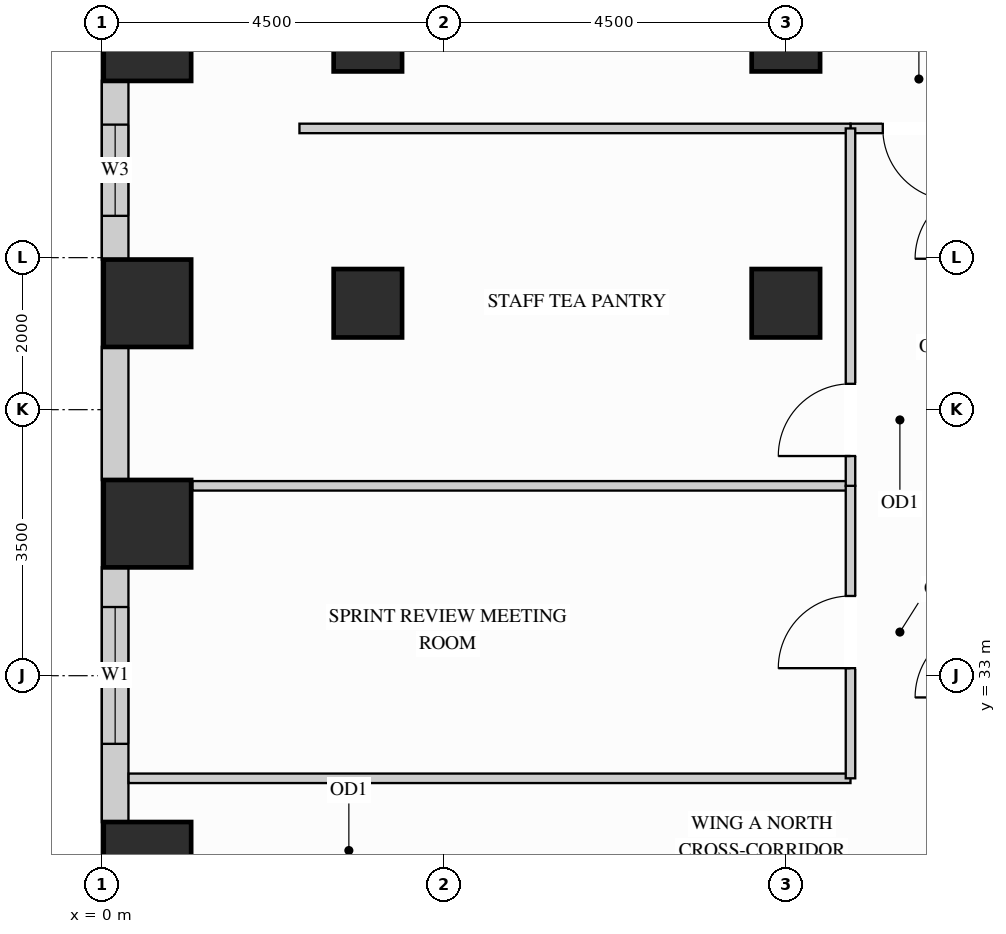
"""IFC4 building model, lengths in metres.
Left out: names, types, materials, properties, quantities, classifications, styles, units other than length and angle.
Written with IfcOpenShell. Run it as: python <this file> out.ifc"""

import sys

from ifc_helpers import new_model, si_unit, direction, frame, frame_2d, origin, origin_2d, place, context, subcontext, project, spatial, rectangle, extrude, source, transform, mapped, element, fill, save


model = new_model("IFC4")
c1 = context("Model", 3, precision=1e-05, world=origin(), true_north=direction((0.0, 1.0)))
c2 = subcontext(c1, "Body", "Model", "MODEL_VIEW")
j1 = project(units=[si_unit("LENGTHUNIT", "METRE"), si_unit("PLANEANGLEUNIT", "RADIAN")], contexts=[c1])
p1 = place(None, origin())
s1 = spatial("IfcSite", under=j1, at=p1, CompositionType="ELEMENT")
p2 = place(p1, origin())
s2 = spatial("IfcBuilding", under=s1, at=p2, CompositionType="ELEMENT")
p3 = place(p2, frame((0.0, 0.0, 102.6)))
s3 = spatial("IfcBuildingStorey", under=s2, at=p3, CompositionType="ELEMENT", Elevation=102.6)
m1 = source(origin(), c2, "Body", "SweptSolid", [
    extrude(rectangle(XDim=0.9, YDim=0.9, at=origin_2d()), origin(), (0.0, 0.0, 1.0), 3.38),
])
for number, where, z_axis, x_axis in (
    (1, (3.5, 37.9, 0.0), (0.0, 0.0, 1.0), (1.0, 0.0, 0.0)),
    (2, (3.5, 41.4, 0.0), (0.0, 0.0, 1.0), (1.0, 0.0, 0.0)),
    (3, (9.0, 37.9, 0.0), (0.0, 0.0, 1.0), (1.0, 0.0, 0.0)),
    (4, (9.0, 41.4, 0.0), (0.0, 0.0, 1.0), (1.0, 0.0, 0.0)),
):
    element("IfcColumn", number, at=place(p3, frame(where, z_axis=z_axis, x_axis=x_axis)), inside=s3, PredefinedType="COLUMN", context=c2, shape_type="MappedRepresentation", body=[
        mapped(m1, transform((0.0, 0.0, 0.0), x_axis=(1.0, 0.0, 0.0), y_axis=(0.0, 1.0, 0.0), z_axis=(0.0, 0.0, 1.0))),
    ])
m2 = source(origin(), c2, "Body", "SweptSolid", [
    extrude(rectangle(XDim=1.15, YDim=1.15, at=origin_2d()), origin(), (0.0, 0.0, 1.0), 3.38),
])
for number, where, z_axis, x_axis in (
    (5, (0.6, 30.5, 0.0), (0.0, 0.0, 1.0), (1.0, 0.0, 0.0)),
    (6, (0.6, 35.0, 0.0), (0.0, 0.0, 1.0), (1.0, 0.0, 0.0)),
    (7, (0.6, 37.9, 0.0), (0.0, 0.0, 1.0), (1.0, 0.0, 0.0)),
    (8, (0.6, 41.4, 0.0), (0.0, 0.0, 1.0), (1.0, 0.0, 0.0)),
):
    element("IfcColumn", number, at=place(p3, frame(where, z_axis=z_axis, x_axis=x_axis)), inside=s3, PredefinedType="COLUMN", context=c2, shape_type="MappedRepresentation", body=[
        mapped(m2, transform((0.0, 0.0, 0.0), x_axis=(1.0, 0.0, 0.0), y_axis=(0.0, 1.0, 0.0), z_axis=(0.0, 0.0, 1.0))),
    ])
p4 = place(p3, frame((0.175, 40.827, 0.0), z_axis=(0.0, 0.0, 1.0), x_axis=(0.0, -1.0, 0.0)))
e9 = element("IfcWall", 9, at=p4, inside=s3, PredefinedType="SOLIDWALL", context=c2, shape_type="SweptSolid", body=[
    extrude(rectangle(XDim=2.354, YDim=0.35, at=frame_2d((1.177, 0.0))), origin(), (0.0, 0.0, 1.0), 3.365),
])
p5 = place(p4, frame((0.577, 0.0, 0.78)))
e10 = element("IfcOpeningElement", 10, at=p5, cuts=e9, PredefinedType="OPENING", context=c2, shape_type="SweptSolid", body=[
    extrude(rectangle(XDim=1.2, YDim=2.1, at=frame_2d((0.6, 1.05))), frame((0.0, 0.185, 0.0), z_axis=(0.0, -1.0, 0.0), x_axis=(1.0, 0.0, 0.0)), (0.0, 0.0, 1.0), 0.37),
])
m3 = source(origin(), c2, "Body", "SweptSolid", [
    extrude(rectangle(XDim=1.754, YDim=0.35, at=frame_2d((0.877, 0.0))), origin(), (0.0, 0.0, 1.0), 3.365),
])
p6 = place(p3, frame((0.175, 37.327, 0.0), z_axis=(0.0, 0.0, 1.0), x_axis=(0.0, -1.0, 0.0)))
e11 = element("IfcWall", 11, at=p6, inside=s3, PredefinedType="SOLIDWALL", context=c2, shape_type="MappedRepresentation", body=[
    mapped(m3, transform((0.0, 0.0, 0.0), x_axis=(1.0, 0.0, 0.0), y_axis=(0.0, 1.0, 0.0), z_axis=(0.0, 0.0, 1.0))),
])
p7 = place(p3, frame((0.175, 34.427, 0.0), z_axis=(0.0, 0.0, 1.0), x_axis=(0.0, -1.0, 0.0)))
e12 = element("IfcWall", 12, at=p7, inside=s3, PredefinedType="SOLIDWALL", context=c2, shape_type="SweptSolid", body=[
    extrude(rectangle(XDim=3.354, YDim=0.35, at=frame_2d((1.677, 0.0))), origin(), (0.0, 0.0, 1.0), 3.365),
])
p8 = place(p7, frame((0.523, 0.0, 0.78)))
e13 = element("IfcOpeningElement", 13, at=p8, cuts=e12, PredefinedType="OPENING", context=c2, shape_type="SweptSolid", body=[
    extrude(rectangle(XDim=1.8, YDim=2.1, at=frame_2d((0.9, 1.05))), frame((0.0, 0.185, 0.0), z_axis=(0.0, -1.0, 0.0), x_axis=(1.0, 0.0, 0.0)), (0.0, 0.0, 1.0), 0.37),
])
m4 = source(origin(), c2, "Body", "SweptSolid", [
    extrude(rectangle(XDim=9.498, YDim=0.125, at=frame_2d((4.749, 0.0))), origin(), (0.0, 0.0, 1.0), 2.828),
])
p9 = place(p3, frame((0.352, 31.65, 0.0), z_axis=(0.0, 0.0, 1.0), x_axis=(1.0, 0.0, 0.0)))
e14 = element("IfcWall", 14, at=p9, inside=s3, PredefinedType="PARTITIONING", context=c2, shape_type="MappedRepresentation", body=[
    mapped(m4, transform((0.0, 0.0, 0.0), x_axis=(1.0, 0.0, 0.0), y_axis=(0.0, 1.0, 0.0), z_axis=(0.0, 0.0, 1.0))),
])
m5 = source(origin(), c2, "Body", "SweptSolid", [
    extrude(rectangle(XDim=8.66, YDim=0.125, at=frame_2d((4.33, 0.0))), origin(), (0.0, 0.0, 1.0), 3.365),
])
p10 = place(p3, frame((1.19, 35.498, 0.0), z_axis=(0.0, 0.0, 1.0), x_axis=(1.0, 0.0, 0.0)))
e15 = element("IfcWall", 15, at=p10, inside=s3, PredefinedType="PARTITIONING", context=c2, shape_type="MappedRepresentation", body=[
    mapped(m5, transform((0.0, 0.0, 0.0), x_axis=(1.0, 0.0, 0.0), y_axis=(0.0, 1.0, 0.0), z_axis=(0.0, 0.0, 1.0))),
])
p11 = place(p3, frame((9.85, 40.2, 0.0), z_axis=(0.0, 0.0, 1.0), x_axis=(1.0, 0.0, 0.0)))
e16 = element("IfcWall", 16, at=p11, inside=s3, PredefinedType="PARTITIONING", context=c2, shape_type="SweptSolid", body=[
    extrude(rectangle(XDim=1.8, YDim=0.125, at=frame_2d((0.9, 0.0))), origin(), (0.0, 0.0, 1.0), 3.365),
])
p12 = place(p11, frame((0.425, 0.0, 0.0)))
e17 = element("IfcOpeningElement", 17, at=p12, cuts=e16, PredefinedType="OPENING", context=c2, shape_type="SweptSolid", body=[
    extrude(rectangle(XDim=0.95, YDim=2.15, at=frame_2d((0.475, 1.075))), frame((0.0, 0.073, 0.0), z_axis=(0.0, -1.0, 0.0), x_axis=(1.0, 0.0, 0.0)), (0.0, 0.0, 1.0), 0.145),
])
m6 = source(origin(), c2, "Body", "SweptSolid", [
    extrude(rectangle(XDim=7.25, YDim=0.125, at=frame_2d((3.625, 0.0))), origin(), (0.0, 0.0, 1.0), 3.365),
])
p13 = place(p3, frame((2.6, 40.2, 0.0), z_axis=(0.0, 0.0, 1.0), x_axis=(1.0, 0.0, 0.0)))
e18 = element("IfcWall", 18, at=p13, inside=s3, PredefinedType="PARTITIONING", context=c2, shape_type="MappedRepresentation", body=[
    mapped(m6, transform((0.0, 0.0, 0.0), x_axis=(1.0, 0.0, 0.0), y_axis=(0.0, 1.0, 0.0), z_axis=(0.0, 0.0, 1.0))),
])
p14 = place(p3, frame((9.85, 31.65, 0.0), z_axis=(0.0, 0.0, 1.0), x_axis=(0.0, 1.0, 0.0)))
e19 = element("IfcWall", 19, at=p14, inside=s3, PredefinedType="PARTITIONING", context=c2, shape_type="SweptSolid", body=[
    extrude(rectangle(XDim=3.848, YDim=0.125, at=frame_2d((1.924, 0.0))), origin(), (0.0, 0.0, 1.0), 3.365),
])
p15 = place(p14, frame((1.449, 0.0, 0.0)))
e20 = element("IfcOpeningElement", 20, at=p15, cuts=e19, PredefinedType="OPENING", context=c2, shape_type="SweptSolid", body=[
    extrude(rectangle(XDim=0.95, YDim=2.15, at=frame_2d((0.475, 1.075))), frame((0.0, 0.073, 0.0), z_axis=(0.0, -1.0, 0.0), x_axis=(1.0, 0.0, 0.0)), (0.0, 0.0, 1.0), 0.145),
])
p16 = place(p3, frame((9.85, 35.498, 0.0), z_axis=(0.0, 0.0, 1.0), x_axis=(0.0, 1.0, 0.0)))
e21 = element("IfcWall", 21, at=p16, inside=s3, PredefinedType="PARTITIONING", context=c2, shape_type="SweptSolid", body=[
    extrude(rectangle(XDim=4.702, YDim=0.125, at=frame_2d((2.351, 0.0))), origin(), (0.0, 0.0, 1.0), 3.365),
])
p17 = place(p16, frame((0.392, 0.0, 0.0)))
e22 = element("IfcOpeningElement", 22, at=p17, cuts=e21, PredefinedType="OPENING", context=c2, shape_type="SweptSolid", body=[
    extrude(rectangle(XDim=0.95, YDim=2.15, at=frame_2d((0.475, 1.075))), frame((0.0, 0.073, 0.0), z_axis=(0.0, -1.0, 0.0), x_axis=(1.0, 0.0, 0.0)), (0.0, 0.0, 1.0), 0.145),
])
m7 = source(origin(), c2, "Body", "SweptSolid", [
    extrude(rectangle(XDim=0.95, YDim=2.15, at=frame_2d((0.475, 1.075))), frame((0.0, 0.025, 0.0), z_axis=(0.0, -1.0, 0.0), x_axis=(1.0, 0.0, 0.0)), (0.0, 0.0, 1.0), 0.05),
])
p18 = place(p12, origin())
e23 = element("IfcDoor", 23, at=p18, inside=s3, OperationType="SINGLE_SWING_RIGHT", PredefinedType="DOOR", context=c2, shape_type="MappedRepresentation", body=[
    mapped(m7, transform((0.0, 0.0, 0.0), x_axis=(1.0, 0.0, 0.0), y_axis=(0.0, 1.0, 0.0), z_axis=(0.0, 0.0, 1.0))),
])
fill(e17, e23)
p19 = place(p15, origin())
e24 = element("IfcDoor", 24, at=p19, inside=s3, OperationType="SINGLE_SWING_LEFT", PredefinedType="DOOR", context=c2, shape_type="MappedRepresentation", body=[
    mapped(m7, transform((0.0, 0.0, 0.0), x_axis=(1.0, 0.0, 0.0), y_axis=(0.0, 1.0, 0.0), z_axis=(0.0, 0.0, 1.0))),
])
fill(e20, e24)
p20 = place(p17, origin())
e25 = element("IfcDoor", 25, at=p20, inside=s3, OperationType="SINGLE_SWING_LEFT", PredefinedType="DOOR", context=c2, shape_type="MappedRepresentation", body=[
    mapped(m7, transform((0.0, 0.0, 0.0), x_axis=(1.0, 0.0, 0.0), y_axis=(0.0, 1.0, 0.0), z_axis=(0.0, 0.0, 1.0))),
])
fill(e22, e25)
m8 = source(origin(), c2, "Body", "SweptSolid", [
    extrude(rectangle(XDim=1.8, YDim=2.1, at=frame_2d((0.9, 1.05))), frame((0.0, 0.03, 0.0), z_axis=(0.0, -1.0, 0.0), x_axis=(1.0, 0.0, 0.0)), (0.0, 0.0, 1.0), 0.06),
])
p21 = place(p8, origin())
e26 = element("IfcWindow", 26, at=p21, inside=s3, PartitioningType="SINGLE_PANEL", PredefinedType="WINDOW", context=c2, shape_type="MappedRepresentation", body=[
    mapped(m8, transform((0.0, 0.0, 0.0), x_axis=(1.0, 0.0, 0.0), y_axis=(0.0, 1.0, 0.0), z_axis=(0.0, 0.0, 1.0))),
])
fill(e13, e26)
m9 = source(origin(), c2, "Body", "SweptSolid", [
    extrude(rectangle(XDim=1.2, YDim=2.1, at=frame_2d((0.6, 1.05))), frame((0.0, 0.03, 0.0), z_axis=(0.0, -1.0, 0.0), x_axis=(1.0, 0.0, 0.0)), (0.0, 0.0, 1.0), 0.06),
])
p22 = place(p5, origin())
e27 = element("IfcWindow", 27, at=p22, inside=s3, PartitioningType="SINGLE_PANEL", PredefinedType="WINDOW", context=c2, shape_type="MappedRepresentation", body=[
    mapped(m9, transform((0.0, 0.0, 0.0), x_axis=(1.0, 0.0, 0.0), y_axis=(0.0, 1.0, 0.0), z_axis=(0.0, 0.0, 1.0))),
])
fill(e10, e27)
save(model, sys.argv[1])
